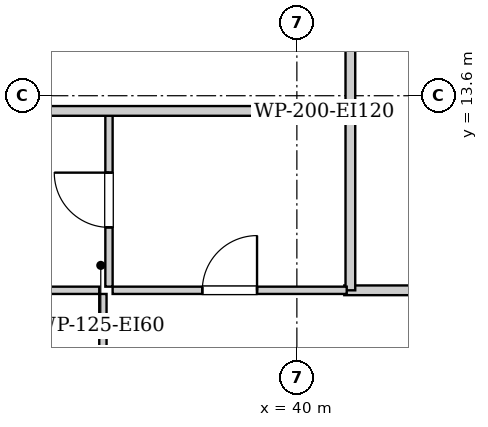
"""IFC4 building model, lengths in metres.
Left out: names, types, materials, properties, quantities, classifications, styles, units other than length and angle.
Written with IfcOpenShell. Run it as: python <this file> out.ifc"""

import sys

from ifc_helpers import new_model, si_unit, direction, frame, frame_2d, origin, place, context, subcontext, project, spatial, rectangle, extrude, element, fill, save


model = new_model("IFC4")
c1 = context("Model", 3, precision=1e-05, world=origin(), true_north=direction((0.0, 1.0)))
c2 = subcontext(c1, "Body", "Model", "MODEL_VIEW")
j1 = project(units=[si_unit("LENGTHUNIT", "METRE"), si_unit("PLANEANGLEUNIT", "RADIAN")], contexts=[c1])
p1 = place(None, origin())
s1 = spatial("IfcSite", under=j1, at=p1, CompositionType="ELEMENT")
p2 = place(p1, origin())
s2 = spatial("IfcBuilding", under=s1, at=p2, CompositionType="ELEMENT")
p3 = place(p2, frame((0.0, 0.0, 97.5)))
s3 = spatial("IfcBuildingStorey", under=s2, at=p3, CompositionType="ELEMENT", Elevation=97.5)
p4 = place(p3, frame((40.88, 13.35, 0.0), z_axis=(0.0, 0.0, 1.0), x_axis=(0.0, 1.0, 0.0)))
e1 = element("IfcWall", 1, at=p4, inside=s3, PredefinedType="PARTITIONING", context=c2, shape_type="SweptSolid", body=[
    extrude(rectangle(XDim=1.74, YDim=0.16, at=frame_2d((0.87, 0.0))), origin(), (0.0, 0.0, 1.0), 2.94),
])
p5 = place(p3, frame((40.78, 10.4, 0.0), z_axis=(0.0, 0.0, 1.0), x_axis=(1.0, 0.0, 0.0)))
e2 = element("IfcWall", 2, at=p5, inside=s3, PredefinedType="PARTITIONING", context=c2, shape_type="SweptSolid", body=[
    extrude(rectangle(XDim=2.34, YDim=0.16, at=frame_2d((1.17, 0.0))), origin(), (0.0, 0.0, 1.0), 2.94),
])
p6 = place(p3, frame((40.88, 10.4, 0.0), z_axis=(0.0, 0.0, 1.0), x_axis=(0.0, 1.0, 0.0)))
e3 = element("IfcWall", 3, at=p6, inside=s3, PredefinedType="PARTITIONING", context=c2, shape_type="SweptSolid", body=[
    extrude(rectangle(XDim=2.91, YDim=0.16, at=frame_2d((1.455, 0.0))), origin(), (0.0, 0.0, 1.0), 2.94),
])
p7 = place(p3, frame((36.91, 10.46, 0.0), z_axis=(0.0, 0.0, 1.0), x_axis=(0.0, 1.0, 0.0)))
e4 = element("IfcWall", 4, at=p7, inside=s3, PredefinedType="PARTITIONING", context=c2, shape_type="SweptSolid", body=[
    extrude(rectangle(XDim=2.85, YDim=0.12, at=frame_2d((1.425, 0.0))), origin(), (0.0, 0.0, 1.0), 2.94),
])
p8 = place(p7, frame((0.975, 0.0, 0.0)))
e5 = element("IfcOpeningElement", 5, at=p8, cuts=e4, PredefinedType="OPENING", context=c2, shape_type="SweptSolid", body=[
    extrude(rectangle(XDim=0.9, YDim=2.05, at=frame_2d((0.45, 1.025))), frame((0.0, 0.07, 0.0), z_axis=(0.0, -1.0, 0.0), x_axis=(1.0, 0.0, 0.0)), (0.0, 0.0, 1.0), 0.14),
])
p9 = place(p3, frame((33.7, 10.4, 0.0), z_axis=(0.0, 0.0, 1.0), x_axis=(1.0, 0.0, 0.0)))
e6 = element("IfcWall", 6, at=p9, inside=s3, PredefinedType="PARTITIONING", context=c2, shape_type="SweptSolid", body=[
    extrude(rectangle(XDim=3.05, YDim=0.12, at=frame_2d((1.525, 0.0))), origin(), (0.0, 0.0, 1.0), 2.94),
])
p10 = place(p9, frame((1.075, 0.0, 0.0)))
e7 = element("IfcOpeningElement", 7, at=p10, cuts=e6, PredefinedType="OPENING", context=c2, shape_type="SweptSolid", body=[
    extrude(rectangle(XDim=0.9, YDim=2.05, at=frame_2d((0.45, 1.025))), frame((0.0, 0.07, 0.0), z_axis=(0.0, -1.0, 0.0), x_axis=(1.0, 0.0, 0.0)), (0.0, 0.0, 1.0), 0.14),
])
p11 = place(p3, frame((36.97, 10.4, 0.0), z_axis=(0.0, 0.0, 1.0), x_axis=(1.0, 0.0, 0.0)))
e8 = element("IfcWall", 8, at=p11, inside=s3, PredefinedType="PARTITIONING", context=c2, shape_type="SweptSolid", body=[
    extrude(rectangle(XDim=3.85, YDim=0.12, at=frame_2d((1.925, 0.0))), origin(), (0.0, 0.0, 1.0), 2.94),
])
p12 = place(p11, frame((1.475, 0.0, 0.0)))
e9 = element("IfcOpeningElement", 9, at=p12, cuts=e8, PredefinedType="OPENING", context=c2, shape_type="SweptSolid", body=[
    extrude(rectangle(XDim=0.9, YDim=2.05, at=frame_2d((0.45, 1.025))), frame((0.0, 0.07, 0.0), z_axis=(0.0, -1.0, 0.0), x_axis=(1.0, 0.0, 0.0)), (0.0, 0.0, 1.0), 0.14),
])
p13 = place(p3, frame((36.81, 0.28, 0.0), z_axis=(0.0, 0.0, 1.0), x_axis=(0.0, 1.0, 0.0)))
e10 = element("IfcWall", 10, at=p13, inside=s3, PredefinedType="PARTITIONING", context=c2, shape_type="SweptSolid", body=[
    extrude(rectangle(XDim=10.06, YDim=0.12, at=frame_2d((5.03, 0.0))), origin(), (0.0, 0.0, 1.0), 2.94),
])
p14 = place(p13, frame((4.565, 0.0, 0.0)))
e11 = element("IfcOpeningElement", 11, at=p14, cuts=e10, PredefinedType="OPENING", context=c2, shape_type="SweptSolid", body=[
    extrude(rectangle(XDim=0.9, YDim=2.05, at=frame_2d((0.45, 1.025))), frame((0.0, 0.07, 0.0), z_axis=(0.0, -1.0, 0.0), x_axis=(1.0, 0.0, 0.0)), (0.0, 0.0, 1.0), 0.14),
])
p15 = place(p3, frame((10.05, 13.35, 0.0), z_axis=(0.0, 0.0, 1.0), x_axis=(1.0, 0.0, 0.0)))
e12 = element("IfcWall", 12, at=p15, inside=s3, PredefinedType="PARTITIONING", context=c2, shape_type="SweptSolid", body=[
    extrude(rectangle(XDim=30.8, YDim=0.16, at=frame_2d((15.4, 0.0))), origin(), (0.0, 0.0, 1.0), 2.94),
])
p16 = place(p15, frame((4.165, 0.0, 0.0)))
e13 = element("IfcOpeningElement", 13, at=p16, cuts=e12, PredefinedType="OPENING", context=c2, shape_type="SweptSolid", body=[
    extrude(rectangle(XDim=0.95, YDim=2.1, at=frame_2d((0.475, 1.05))), frame((0.0, 0.09, 0.0), z_axis=(0.0, -1.0, 0.0), x_axis=(1.0, 0.0, 0.0)), (0.0, 0.0, 1.0), 0.18),
])
p17 = place(p8, origin())
e14 = element("IfcDoor", 14, at=p17, inside=s3, OperationType="SINGLE_SWING_RIGHT", PredefinedType="DOOR", context=c2, shape_type="SweptSolid", body=[
    extrude(rectangle(XDim=0.9, YDim=2.05, at=frame_2d((0.45, 1.025))), frame((0.0, 0.025, 0.0), z_axis=(0.0, -1.0, 0.0), x_axis=(1.0, 0.0, 0.0)), (0.0, 0.0, 1.0), 0.05),
])
fill(e5, e14)
p18 = place(p12, origin())
e15 = element("IfcDoor", 15, at=p18, inside=s3, OperationType="SINGLE_SWING_RIGHT", PredefinedType="DOOR", context=c2, shape_type="SweptSolid", body=[
    extrude(rectangle(XDim=0.9, YDim=2.05, at=frame_2d((0.45, 1.025))), frame((0.0, 0.025, 0.0), z_axis=(0.0, -1.0, 0.0), x_axis=(1.0, 0.0, 0.0)), (0.0, 0.0, 1.0), 0.05),
])
fill(e9, e15)
save(model, sys.argv[1])
